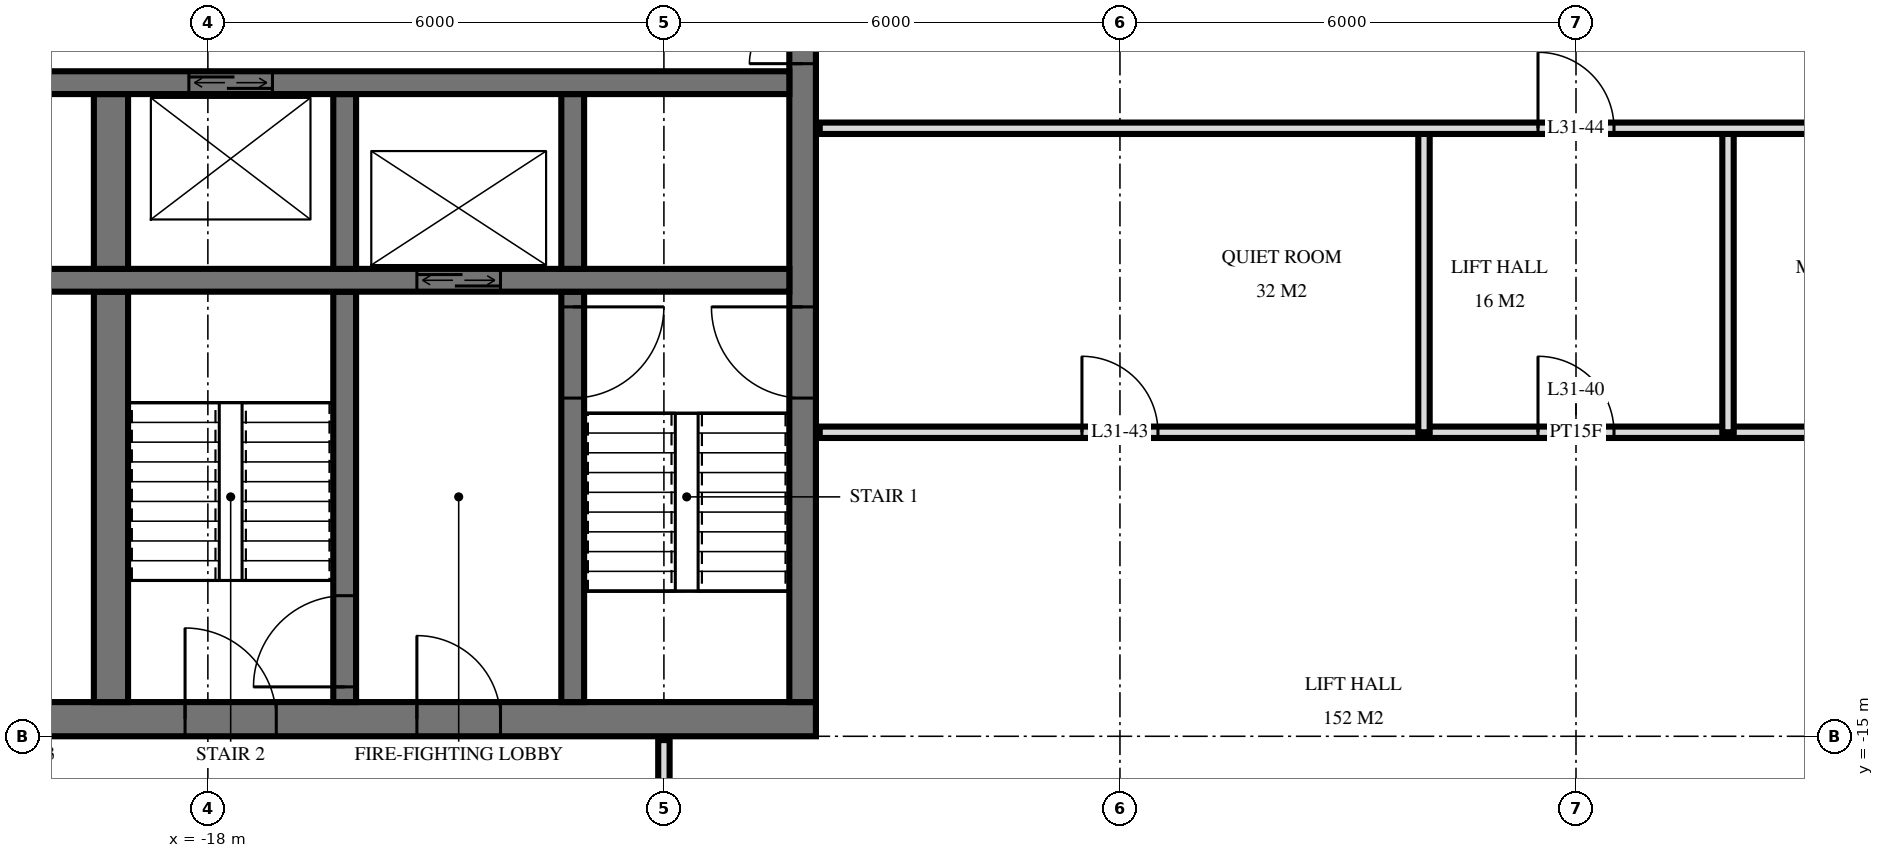
"""IFC4 building model, lengths in metres.
Left out: names, types, materials, properties, quantities, classifications, styles, units other than length and angle.
Written with IfcOpenShell. Run it as: python <this file> out.ifc"""

import sys

from ifc_helpers import new_model, si_unit, direction, frame, frame_2d, origin, place, context, subcontext, project, spatial, rectangle, extrude, element, fill, save


model = new_model("IFC4")
c1 = context("Model", 3, precision=1e-05, world=origin(), true_north=direction((0.0, 1.0)))
c2 = subcontext(c1, "Body", "Model", "MODEL_VIEW")
j1 = project(units=[si_unit("LENGTHUNIT", "METRE"), si_unit("PLANEANGLEUNIT", "RADIAN")], contexts=[c1])
p1 = place(None, origin())
s1 = spatial("IfcSite", under=j1, at=p1, CompositionType="ELEMENT")
p2 = place(p1, origin())
s2 = spatial("IfcBuilding", under=s1, at=p2, CompositionType="ELEMENT")
p3 = place(p2, frame((0.0, 0.0, 123.6)))
s3 = spatial("IfcBuildingStorey", under=s2, at=p3, CompositionType="ELEMENT", Elevation=123.6)
p4 = place(p3, frame((-24.5, -14.775, 0.0), z_axis=(0.0, 0.0, 1.0), x_axis=(1.0, 0.0, 0.0)))
e1 = element("IfcWall", 1, at=p4, inside=s3, PredefinedType="SHEAR", context=c2, shape_type="SweptSolid", body=[
    extrude(rectangle(XDim=14.5, YDim=0.45, at=frame_2d((7.25, 0.0))), origin(), (0.0, 0.0, 1.0), 3.6),
])
p5 = place(p4, frame((6.2, 0.0, 0.0)))
e2 = element("IfcOpeningElement", 2, at=p5, cuts=e1, PredefinedType="OPENING", context=c2, shape_type="SweptSolid", body=[
    extrude(rectangle(XDim=1.2, YDim=2.1, at=frame_2d((0.6, 1.05))), frame((0.0, 0.235, 0.0), z_axis=(0.0, -1.0, 0.0), x_axis=(1.0, 0.0, 0.0)), (0.0, 0.0, 1.0), 0.47),
])
p6 = place(p4, frame((9.25, 0.0, 0.0)))
e3 = element("IfcOpeningElement", 3, at=p6, cuts=e1, PredefinedType="OPENING", context=c2, shape_type="SweptSolid", body=[
    extrude(rectangle(XDim=1.1, YDim=2.1, at=frame_2d((0.55, 1.05))), frame((0.0, 0.235, 0.0), z_axis=(0.0, -1.0, 0.0), x_axis=(1.0, 0.0, 0.0)), (0.0, 0.0, 1.0), 0.47),
])
p7 = place(p4, frame((3.5, 0.0, 0.0)))
e4 = element("IfcOpeningElement", 4, at=p7, cuts=e1, PredefinedType="OPENING", context=c2, shape_type="SweptSolid", body=[
    extrude(rectangle(XDim=0.9, YDim=2.1, at=frame_2d((0.45, 1.05))), frame((0.0, 0.235, 0.0), z_axis=(0.0, -1.0, 0.0), x_axis=(1.0, 0.0, 0.0)), (0.0, 0.0, 1.0), 0.47),
])
p8 = place(p4, frame((1.05, 0.0, 0.0)))
e5 = element("IfcOpeningElement", 5, at=p8, cuts=e1, PredefinedType="OPENING", context=c2, shape_type="SweptSolid", body=[
    extrude(rectangle(XDim=1.0, YDim=2.1, at=frame_2d((0.5, 1.05))), frame((0.0, 0.235, 0.0), z_axis=(0.0, -1.0, 0.0), x_axis=(1.0, 0.0, 0.0)), (0.0, 0.0, 1.0), 0.47),
])
p9 = place(p3, frame((-10.175, -14.55, 0.0), z_axis=(0.0, 0.0, 1.0), x_axis=(0.0, 1.0, 0.0)))
e6 = element("IfcWall", 6, at=p9, inside=s3, PredefinedType="SHEAR", context=c2, shape_type="SweptSolid", body=[
    extrude(rectangle(XDim=14.1, YDim=0.35, at=frame_2d((7.05, 0.0))), origin(), (0.0, 0.0, 1.0), 3.6),
])
p10 = place(p9, frame((8.4, 0.0, 0.0)))
e7 = element("IfcOpeningElement", 7, at=p10, cuts=e6, PredefinedType="OPENING", context=c2, shape_type="SweptSolid", body=[
    extrude(rectangle(XDim=1.4, YDim=2.4, at=frame_2d((0.7, 1.2))), frame((0.0, 0.185, 0.0), z_axis=(0.0, -1.0, 0.0), x_axis=(1.0, 0.0, 0.0)), (0.0, 0.0, 1.0), 0.37),
])
p11 = place(p9, frame((10.0, 0.0, 0.0)))
e8 = element("IfcOpeningElement", 8, at=p11, cuts=e6, PredefinedType="OPENING", context=c2, shape_type="SweptSolid", body=[
    extrude(rectangle(XDim=1.4, YDim=2.4, at=frame_2d((0.7, 1.2))), frame((0.0, 0.185, 0.0), z_axis=(0.0, -1.0, 0.0), x_axis=(1.0, 0.0, 0.0)), (0.0, 0.0, 1.0), 0.37),
])
p12 = place(p9, frame((4.0, 0.0, 0.0)))
e9 = element("IfcOpeningElement", 9, at=p12, cuts=e6, PredefinedType="OPENING", context=c2, shape_type="SweptSolid", body=[
    extrude(rectangle(XDim=1.2, YDim=2.1, at=frame_2d((0.6, 1.05))), frame((0.0, 0.185, 0.0), z_axis=(0.0, -1.0, 0.0), x_axis=(1.0, 0.0, 0.0)), (0.0, 0.0, 1.0), 0.37),
])
p13 = place(p3, frame((-24.05, -6.4, 0.0), z_axis=(0.0, 0.0, 1.0), x_axis=(1.0, 0.0, 0.0)))
e10 = element("IfcWall", 10, at=p13, inside=s3, PredefinedType="SHEAR", context=c2, shape_type="SweptSolid", body=[
    extrude(rectangle(XDim=13.7, YDim=0.3, at=frame_2d((6.85, 0.0))), origin(), (0.0, 0.0, 1.0), 3.6),
])
p14 = place(p13, frame((0.55, 0.0, 0.0)))
e11 = element("IfcOpeningElement", 11, at=p14, cuts=e10, PredefinedType="OPENING", context=c2, shape_type="SweptSolid", body=[
    extrude(rectangle(XDim=1.1, YDim=2.1, at=frame_2d((0.55, 1.05))), frame((0.0, 0.16, 0.0), z_axis=(0.0, -1.0, 0.0), x_axis=(1.0, 0.0, 0.0)), (0.0, 0.0, 1.0), 0.32),
])
p15 = place(p13, frame((5.8, 0.0, 0.0)))
e12 = element("IfcOpeningElement", 12, at=p15, cuts=e10, PredefinedType="OPENING", context=c2, shape_type="SweptSolid", body=[
    extrude(rectangle(XDim=1.1, YDim=2.1, at=frame_2d((0.55, 1.05))), frame((0.0, 0.16, 0.0), z_axis=(0.0, -1.0, 0.0), x_axis=(1.0, 0.0, 0.0)), (0.0, 0.0, 1.0), 0.32),
])
p16 = place(p3, frame((-24.05, -9.0, 0.0), z_axis=(0.0, 0.0, 1.0), x_axis=(1.0, 0.0, 0.0)))
e13 = element("IfcWall", 13, at=p16, inside=s3, PredefinedType="SHEAR", context=c2, shape_type="SweptSolid", body=[
    extrude(rectangle(XDim=13.7, YDim=0.3, at=frame_2d((6.85, 0.0))), origin(), (0.0, 0.0, 1.0), 3.6),
])
p17 = place(p16, frame((8.8, 0.0, 0.0)))
e14 = element("IfcOpeningElement", 14, at=p17, cuts=e13, PredefinedType="OPENING", context=c2, shape_type="SweptSolid", body=[
    extrude(rectangle(XDim=1.1, YDim=2.1, at=frame_2d((0.55, 1.05))), frame((0.0, 0.16, 0.0), z_axis=(0.0, -1.0, 0.0), x_axis=(1.0, 0.0, 0.0)), (0.0, 0.0, 1.0), 0.32),
])
p18 = place(p3, frame((-13.2, -8.85, 0.0), z_axis=(0.0, 0.0, 1.0), x_axis=(0.0, 1.0, 0.0)))
e15 = element("IfcWall", 15, at=p18, inside=s3, PredefinedType="SHEAR", context=c2, shape_type="SweptSolid", body=[
    extrude(rectangle(XDim=2.3, YDim=0.3, at=frame_2d((1.15, 0.0))), origin(), (0.0, 0.0, 1.0), 3.6),
])
p19 = place(p3, frame((-13.2, -14.55, 0.0), z_axis=(0.0, 0.0, 1.0), x_axis=(0.0, 1.0, 0.0)))
e16 = element("IfcWall", 16, at=p19, inside=s3, PredefinedType="SHEAR", context=c2, shape_type="SweptSolid", body=[
    extrude(rectangle(XDim=5.4, YDim=0.3, at=frame_2d((2.7, 0.0))), origin(), (0.0, 0.0, 1.0), 3.6),
])
p20 = place(p19, frame((4.0, 0.0, 0.0)))
e17 = element("IfcOpeningElement", 17, at=p20, cuts=e16, PredefinedType="OPENING", context=c2, shape_type="SweptSolid", body=[
    extrude(rectangle(XDim=1.2, YDim=2.1, at=frame_2d((0.6, 1.05))), frame((0.0, 0.16, 0.0), z_axis=(0.0, -1.0, 0.0), x_axis=(1.0, 0.0, 0.0)), (0.0, 0.0, 1.0), 0.32),
])
p21 = place(p3, frame((-16.2, -8.85, 0.0), z_axis=(0.0, 0.0, 1.0), x_axis=(0.0, 1.0, 0.0)))
e18 = element("IfcWall", 18, at=p21, inside=s3, PredefinedType="SHEAR", context=c2, shape_type="SweptSolid", body=[
    extrude(rectangle(XDim=2.3, YDim=0.3, at=frame_2d((1.15, 0.0))), origin(), (0.0, 0.0, 1.0), 3.6),
])
p22 = place(p3, frame((-16.2, -14.55, 0.0), z_axis=(0.0, 0.0, 1.0), x_axis=(0.0, 1.0, 0.0)))
e19 = element("IfcWall", 19, at=p22, inside=s3, PredefinedType="SHEAR", context=c2, shape_type="SweptSolid", body=[
    extrude(rectangle(XDim=5.4, YDim=0.3, at=frame_2d((2.7, 0.0))), origin(), (0.0, 0.0, 1.0), 3.6),
])
p23 = place(p22, frame((0.2, 0.0, 0.0)))
e20 = element("IfcOpeningElement", 20, at=p23, cuts=e19, PredefinedType="OPENING", context=c2, shape_type="SweptSolid", body=[
    extrude(rectangle(XDim=1.2, YDim=2.1, at=frame_2d((0.6, 1.05))), frame((0.0, 0.16, 0.0), z_axis=(0.0, -1.0, 0.0), x_axis=(1.0, 0.0, 0.0)), (0.0, 0.0, 1.0), 0.32),
])
p24 = place(p3, frame((-19.275, -8.85, 0.0), z_axis=(0.0, 0.0, 1.0), x_axis=(0.0, 1.0, 0.0)))
e21 = element("IfcWall", 21, at=p24, inside=s3, PredefinedType="SHEAR", context=c2, shape_type="SweptSolid", body=[
    extrude(rectangle(XDim=2.3, YDim=0.45, at=frame_2d((1.15, 0.0))), origin(), (0.0, 0.0, 1.0), 3.6),
])
p25 = place(p3, frame((-19.275, -14.55, 0.0), z_axis=(0.0, 0.0, 1.0), x_axis=(0.0, 1.0, 0.0)))
e22 = element("IfcWall", 22, at=p25, inside=s3, PredefinedType="SHEAR", context=c2, shape_type="SweptSolid", body=[
    extrude(rectangle(XDim=5.4, YDim=0.45, at=frame_2d((2.7, 0.0))), origin(), (0.0, 0.0, 1.0), 3.6),
])
for number, where, z_axis, x_axis in (
    (23, (2.0, -11.0, 0.0), (0.0, 0.0, 1.0), (0.0, 1.0, 0.0)),
    (24, (-2.0, -11.0, 0.0), (0.0, 0.0, 1.0), (0.0, 1.0, 0.0)),
):
    element("IfcWall", number, at=place(p3, frame(where, z_axis=z_axis, x_axis=x_axis)), inside=s3, PredefinedType="PARTITIONING", context=c2, shape_type="SweptSolid", body=[
        extrude(rectangle(XDim=4.0, YDim=0.15, at=frame_2d((2.0, 0.0))), origin(), (0.0, 0.0, 1.0), 3.32),
    ])
p26 = place(p3, frame((-12.0, -18.0, 0.0), z_axis=(0.0, 0.0, 1.0), x_axis=(0.0, 1.0, 0.0)))
e25 = element("IfcWall", 25, at=p26, inside=s3, PredefinedType="PARTITIONING", context=c2, shape_type="SweptSolid", body=[
    extrude(rectangle(XDim=2.95, YDim=0.15, at=frame_2d((1.475, 0.0))), origin(), (0.0, 0.0, 1.0), 3.32),
])
p27 = place(p26, frame((1.0, 0.0, 0.0)))
e26 = element("IfcOpeningElement", 26, at=p27, cuts=e25, PredefinedType="OPENING", context=c2, shape_type="SweptSolid", body=[
    extrude(rectangle(XDim=1.0, YDim=2.1, at=frame_2d((0.5, 1.05))), frame((0.0, 0.085, 0.0), z_axis=(0.0, -1.0, 0.0), x_axis=(1.0, 0.0, 0.0)), (0.0, 0.0, 1.0), 0.17),
])
p28 = place(p3, frame((-9.95, -11.0, 0.0), z_axis=(0.0, 0.0, 1.0), x_axis=(1.0, 0.0, 0.0)))
e27 = element("IfcWall", 27, at=p28, inside=s3, PredefinedType="PARTITIONING", context=c2, shape_type="SweptSolid", body=[
    extrude(rectangle(XDim=19.9, YDim=0.15, at=frame_2d((9.95, 0.0))), origin(), (0.0, 0.0, 1.0), 3.32),
])
p29 = place(p28, frame((9.45, 0.0, 0.0)))
e28 = element("IfcOpeningElement", 28, at=p29, cuts=e27, PredefinedType="OPENING", context=c2, shape_type="SweptSolid", body=[
    extrude(rectangle(XDim=1.0, YDim=2.1, at=frame_2d((0.5, 1.05))), frame((0.0, 0.085, 0.0), z_axis=(0.0, -1.0, 0.0), x_axis=(1.0, 0.0, 0.0)), (0.0, 0.0, 1.0), 0.17),
])
p30 = place(p28, frame((3.45, 0.0, 0.0)))
e29 = element("IfcOpeningElement", 29, at=p30, cuts=e27, PredefinedType="OPENING", context=c2, shape_type="SweptSolid", body=[
    extrude(rectangle(XDim=1.0, YDim=2.1, at=frame_2d((0.5, 1.05))), frame((0.0, 0.085, 0.0), z_axis=(0.0, -1.0, 0.0), x_axis=(1.0, 0.0, 0.0)), (0.0, 0.0, 1.0), 0.17),
])
p31 = place(p3, frame((-9.95, -7.0, 0.0), z_axis=(0.0, 0.0, 1.0), x_axis=(1.0, 0.0, 0.0)))
e30 = element("IfcWall", 30, at=p31, inside=s3, PredefinedType="PARTITIONING", context=c2, shape_type="SweptSolid", body=[
    extrude(rectangle(XDim=19.9, YDim=0.15, at=frame_2d((9.95, 0.0))), origin(), (0.0, 0.0, 1.0), 3.32),
])
p32 = place(p31, frame((9.45, 0.0, 0.0)))
e31 = element("IfcOpeningElement", 31, at=p32, cuts=e30, PredefinedType="OPENING", context=c2, shape_type="SweptSolid", body=[
    extrude(rectangle(XDim=1.0, YDim=2.1, at=frame_2d((0.5, 1.05))), frame((0.0, 0.085, 0.0), z_axis=(0.0, -1.0, 0.0), x_axis=(1.0, 0.0, 0.0)), (0.0, 0.0, 1.0), 0.17),
])
p33 = place(p31, frame((15.45, 0.0, 0.0)))
e32 = element("IfcOpeningElement", 32, at=p33, cuts=e30, PredefinedType="OPENING", context=c2, shape_type="SweptSolid", body=[
    extrude(rectangle(XDim=1.0, YDim=2.1, at=frame_2d((0.5, 1.05))), frame((0.0, 0.085, 0.0), z_axis=(0.0, -1.0, 0.0), x_axis=(1.0, 0.0, 0.0)), (0.0, 0.0, 1.0), 0.17),
])
p34 = place(p17, origin())
e33 = element("IfcDoor", 33, at=p34, inside=s3, OperationType="DOUBLE_DOOR_SLIDING", PredefinedType="USERDEFINED", context=c2, shape_type="SweptSolid", body=[
    extrude(rectangle(XDim=1.1, YDim=2.1, at=frame_2d((0.55, 1.05))), frame((0.0, 0.025, 0.0), z_axis=(0.0, -1.0, 0.0), x_axis=(1.0, 0.0, 0.0)), (0.0, 0.0, 1.0), 0.05),
])
fill(e14, e33)
p35 = place(p15, origin())
e34 = element("IfcDoor", 34, at=p35, inside=s3, OperationType="DOUBLE_DOOR_SLIDING", PredefinedType="USERDEFINED", context=c2, shape_type="SweptSolid", body=[
    extrude(rectangle(XDim=1.1, YDim=2.1, at=frame_2d((0.55, 1.05))), frame((0.0, 0.025, 0.0), z_axis=(0.0, -1.0, 0.0), x_axis=(1.0, 0.0, 0.0)), (0.0, 0.0, 1.0), 0.05),
])
fill(e12, e34)
p36 = place(p10, origin())
e35 = element("IfcDoor", 35, at=p36, inside=s3, OperationType="DOUBLE_DOOR_SINGLE_SWING", PredefinedType="DOOR", context=c2, shape_type="SweptSolid", body=[
    extrude(rectangle(XDim=1.4, YDim=2.4, at=frame_2d((0.7, 1.2))), frame((0.0, 0.025, 0.0), z_axis=(0.0, -1.0, 0.0), x_axis=(1.0, 0.0, 0.0)), (0.0, 0.0, 1.0), 0.05),
])
fill(e7, e35)
p37 = place(p12, origin())
e36 = element("IfcDoor", 36, at=p37, inside=s3, OperationType="SINGLE_SWING_LEFT", PredefinedType="DOOR", context=c2, shape_type="SweptSolid", body=[
    extrude(rectangle(XDim=1.2, YDim=2.1, at=frame_2d((0.6, 1.05))), frame((0.0, 0.025, 0.0), z_axis=(0.0, -1.0, 0.0), x_axis=(1.0, 0.0, 0.0)), (0.0, 0.0, 1.0), 0.05),
])
fill(e9, e36)
p38 = place(p5, origin())
e37 = element("IfcDoor", 37, at=p38, inside=s3, OperationType="SINGLE_SWING_RIGHT", PredefinedType="DOOR", context=c2, shape_type="SweptSolid", body=[
    extrude(rectangle(XDim=1.2, YDim=2.1, at=frame_2d((0.6, 1.05))), frame((0.0, 0.025, 0.0), z_axis=(0.0, -1.0, 0.0), x_axis=(1.0, 0.0, 0.0)), (0.0, 0.0, 1.0), 0.05),
])
fill(e2, e37)
p39 = place(p6, origin())
e38 = element("IfcDoor", 38, at=p39, inside=s3, OperationType="SINGLE_SWING_RIGHT", PredefinedType="DOOR", context=c2, shape_type="SweptSolid", body=[
    extrude(rectangle(XDim=1.1, YDim=2.1, at=frame_2d((0.55, 1.05))), frame((0.0, 0.025, 0.0), z_axis=(0.0, -1.0, 0.0), x_axis=(1.0, 0.0, 0.0)), (0.0, 0.0, 1.0), 0.05),
])
fill(e3, e38)
p40 = place(p20, frame((0.6, 0.0, 0.0), z_axis=(0.0, 0.0, 1.0), x_axis=(-1.0, 0.0, 0.0)))
e39 = element("IfcDoor", 39, at=p40, inside=s3, OperationType="SINGLE_SWING_RIGHT", PredefinedType="DOOR", context=c2, shape_type="SweptSolid", body=[
    extrude(rectangle(XDim=1.2, YDim=2.1, at=frame_2d((0.0, 1.05))), frame((0.0, -0.025, 0.0), z_axis=(0.0, 1.0, 0.0), x_axis=(-1.0, 0.0, 0.0)), (0.0, 0.0, 1.0), 0.05),
])
fill(e17, e39)
p41 = place(p23, origin())
e40 = element("IfcDoor", 40, at=p41, inside=s3, OperationType="SINGLE_SWING_RIGHT", PredefinedType="DOOR", context=c2, shape_type="SweptSolid", body=[
    extrude(rectangle(XDim=1.2, YDim=2.1, at=frame_2d((0.6, 1.05))), frame((0.0, 0.025, 0.0), z_axis=(0.0, -1.0, 0.0), x_axis=(1.0, 0.0, 0.0)), (0.0, 0.0, 1.0), 0.05),
])
fill(e20, e40)
p42 = place(p29, origin())
e41 = element("IfcDoor", 41, at=p42, inside=s3, OperationType="SINGLE_SWING_RIGHT", PredefinedType="DOOR", context=c2, shape_type="SweptSolid", body=[
    extrude(rectangle(XDim=1.0, YDim=2.1, at=frame_2d((0.5, 1.05))), frame((0.0, 0.025, 0.0), z_axis=(0.0, -1.0, 0.0), x_axis=(1.0, 0.0, 0.0)), (0.0, 0.0, 1.0), 0.05),
])
fill(e28, e41)
p43 = place(p30, origin())
e42 = element("IfcDoor", 42, at=p43, inside=s3, OperationType="SINGLE_SWING_RIGHT", PredefinedType="DOOR", context=c2, shape_type="SweptSolid", body=[
    extrude(rectangle(XDim=1.0, YDim=2.1, at=frame_2d((0.5, 1.05))), frame((0.0, 0.025, 0.0), z_axis=(0.0, -1.0, 0.0), x_axis=(1.0, 0.0, 0.0)), (0.0, 0.0, 1.0), 0.05),
])
fill(e29, e42)
p44 = place(p32, origin())
e43 = element("IfcDoor", 43, at=p44, inside=s3, OperationType="SINGLE_SWING_RIGHT", PredefinedType="DOOR", context=c2, shape_type="SweptSolid", body=[
    extrude(rectangle(XDim=1.0, YDim=2.1, at=frame_2d((0.5, 1.05))), frame((0.0, 0.025, 0.0), z_axis=(0.0, -1.0, 0.0), x_axis=(1.0, 0.0, 0.0)), (0.0, 0.0, 1.0), 0.05),
])
fill(e31, e43)
save(model, sys.argv[1])
